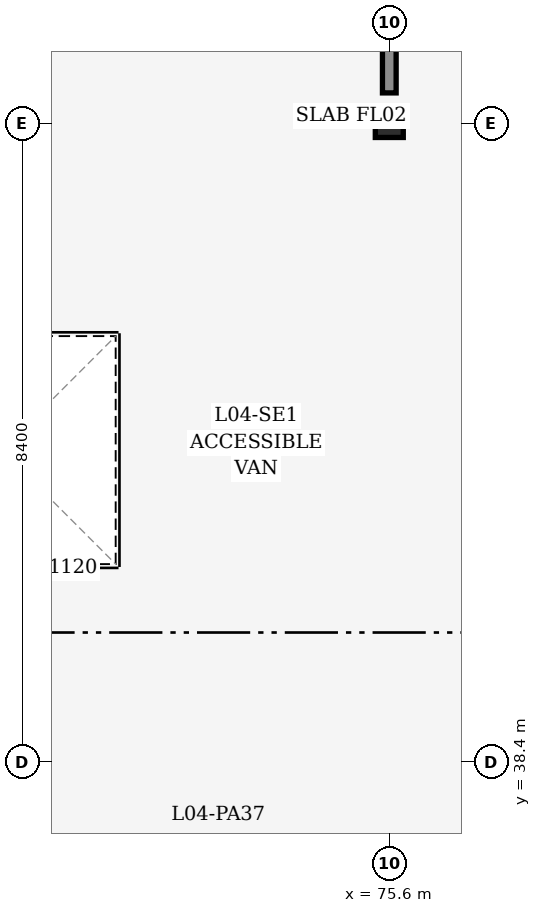
"""IFC4 building model, lengths in metres.
Left out: names, types, materials, properties, quantities, classifications, styles, units other than length and angle.
Written with IfcOpenShell. Run it as: python <this file> out.ifc"""

import sys

from ifc_helpers import new_model, si_unit, direction, frame, frame_2d, origin, origin_2d, place, context, subcontext, project, spatial, rectangle, i_section, extrude, element, save


model = new_model("IFC4")
c1 = context("Model", 3, precision=1e-05, world=origin(), true_north=direction((0.0, 1.0)))
c2 = subcontext(c1, "Body", "Model", "MODEL_VIEW")
j1 = project(units=[si_unit("LENGTHUNIT", "METRE"), si_unit("PLANEANGLEUNIT", "RADIAN")], contexts=[c1])
p1 = place(None, origin())
s1 = spatial("IfcSite", under=j1, at=p1, CompositionType="ELEMENT")
p2 = place(p1, origin())
s2 = spatial("IfcBuilding", under=s1, at=p2, CompositionType="ELEMENT")
p3 = place(p2, frame((0.0, 0.0, 16.2)))
s3 = spatial("IfcBuildingStorey", under=s2, at=p3, CompositionType="ELEMENT", Elevation=16.2)
for number, where, z_axis, x_axis in (
    (1, (75.6, 38.4, 0.0), (0.0, 0.0, 1.0), (1.0, 0.0, 0.0)),
    (2, (75.6, 46.8, 0.0), (0.0, 0.0, 1.0), (1.0, 0.0, 0.0)),
):
    element("IfcColumn", number, at=place(p3, frame(where, z_axis=z_axis, x_axis=x_axis)), inside=s3, PredefinedType="COLUMN", context=c2, shape_type="SweptSolid", body=[
        extrude(i_section(OverallWidth=0.373, OverallDepth=0.368, WebThickness=0.014, FlangeThickness=0.024, FilletRadius=0.015, at=origin_2d()), origin(), (0.0, 0.0, 1.0), 3.6),
    ])
p4 = place(p3, frame((75.6, 47.2, 0.0), z_axis=(0.0, 0.0, 1.0), x_axis=(0.0, 1.0, 0.0)))
e3 = element("IfcWall", 3, at=p4, inside=s3, PredefinedType="PARTITIONING", context=c2, shape_type="SweptSolid", body=[
    extrude(rectangle(XDim=16.0, YDim=0.18, at=frame_2d((8.0, 0.0))), origin(), (0.0, 0.0, 1.0), 2.525),
])
p5 = place(p4, frame((4.0, 0.0, 0.0)))
e4 = element("IfcOpeningElement", 4, at=p5, cuts=e3, PredefinedType="OPENING", context=c2, shape_type="SweptSolid", body=[
    extrude(rectangle(XDim=1.0, YDim=2.15, at=frame_2d((0.5, 1.075))), frame((0.0, 0.1, 0.0), z_axis=(0.0, -1.0, 0.0), x_axis=(1.0, 0.0, 0.0)), (0.0, 0.0, 1.0), 0.2),
])
save(model, sys.argv[1])
